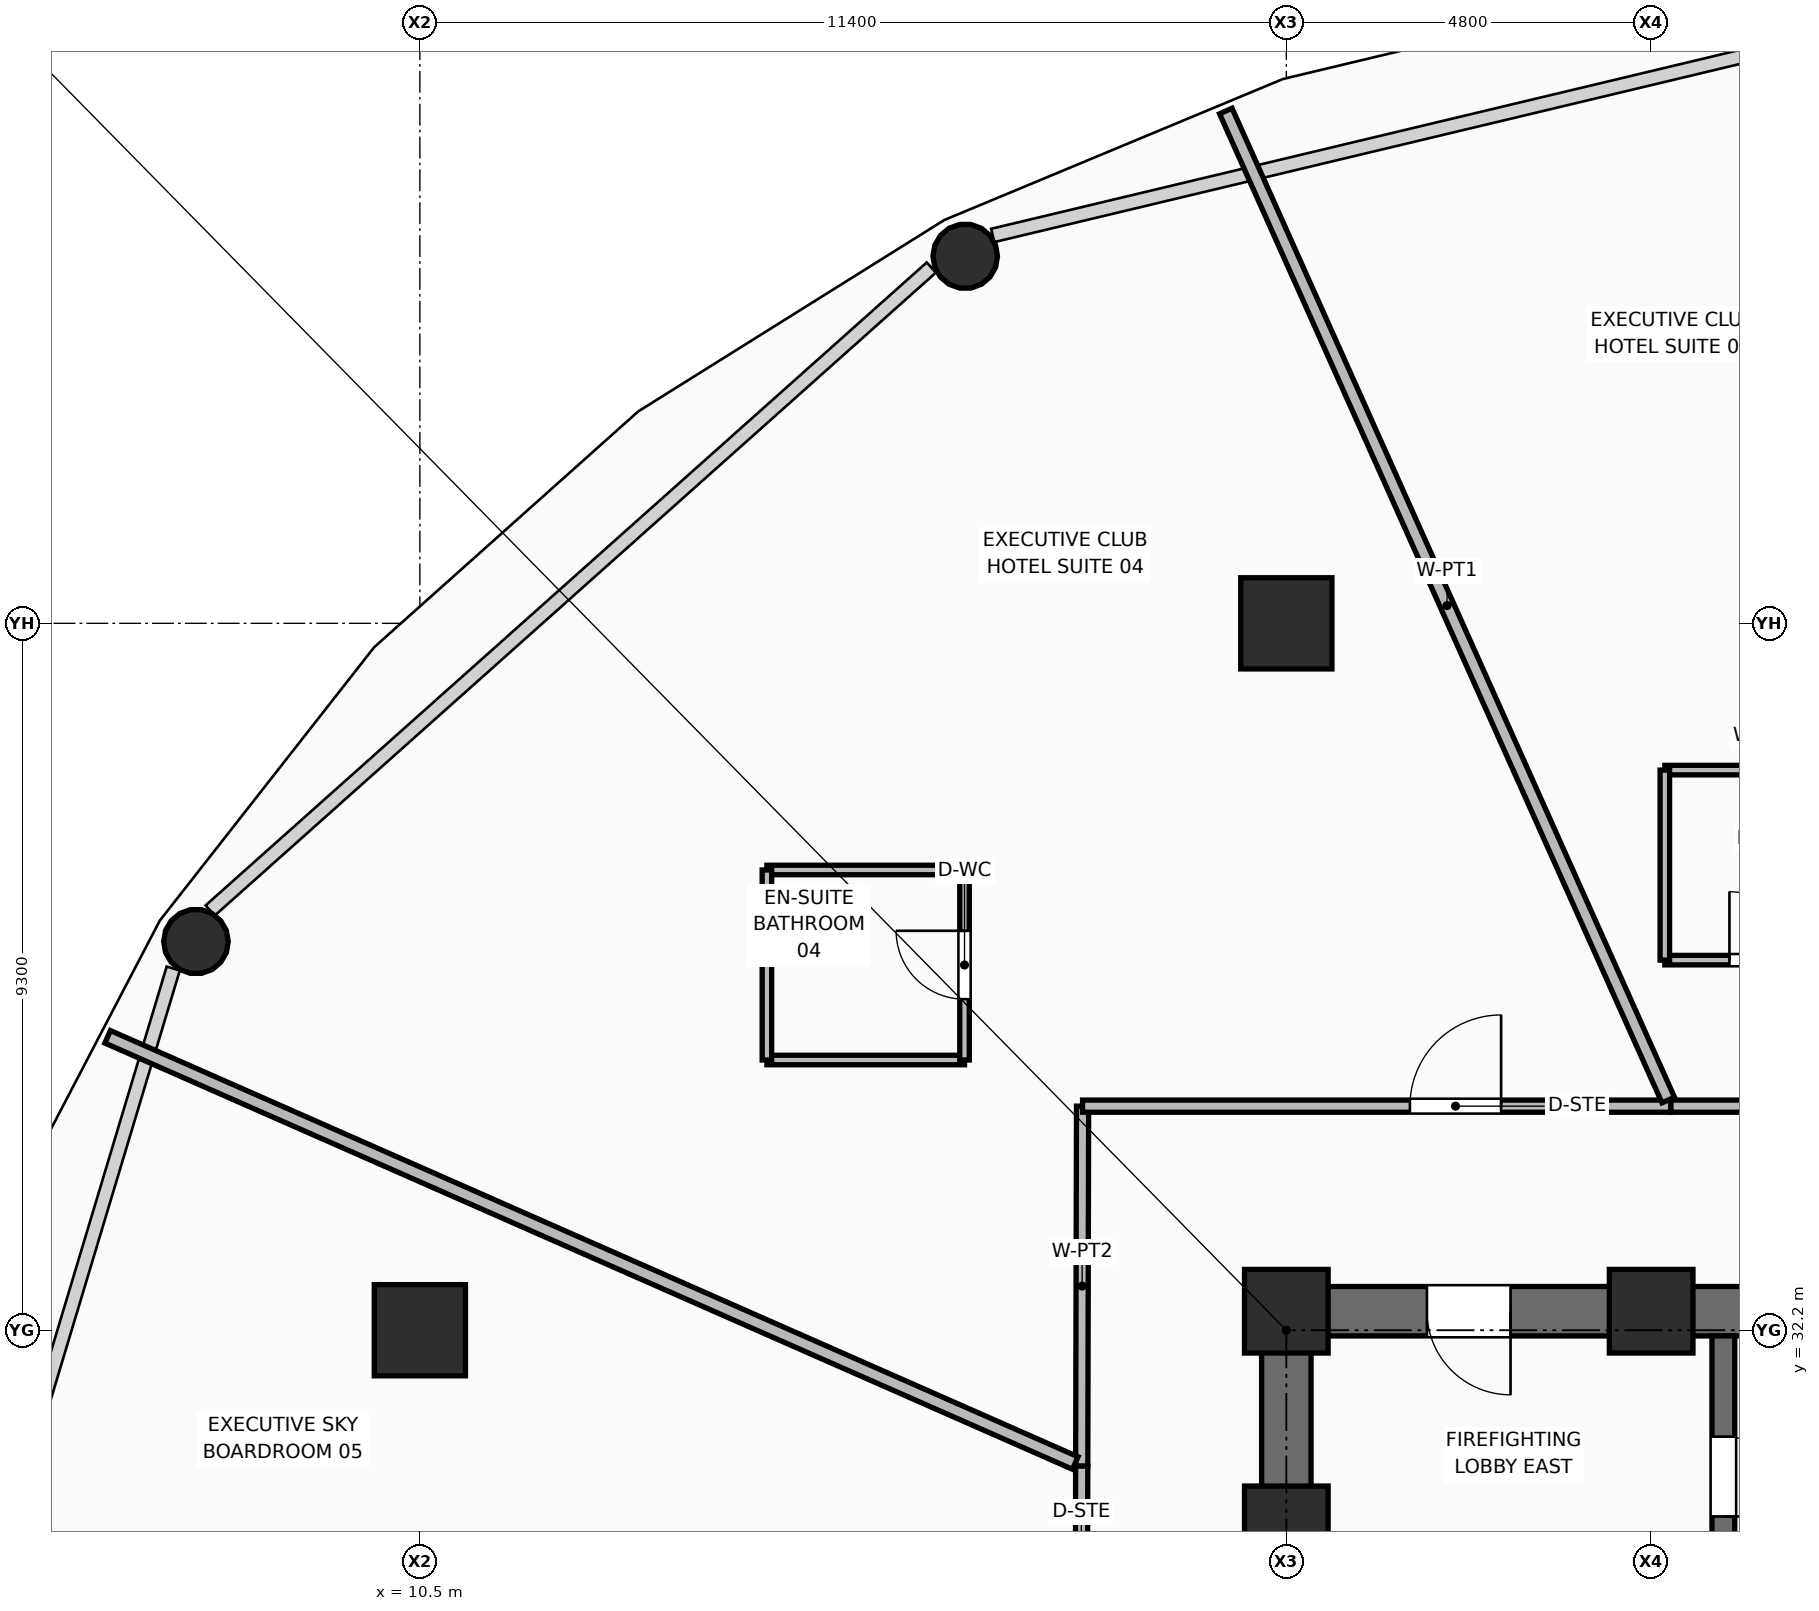
"""IFC4 building model, lengths in metres.
Left out: names, types, materials, properties, quantities, classifications, styles, units other than length and angle.
Written with IfcOpenShell. Run it as: python <this file> out.ifc"""

import sys

from ifc_helpers import new_model, si_unit, direction, frame, frame_2d, origin, origin_2d, place, context, subcontext, project, spatial, rectangle, hollow_rectangle, hollow_circle, extrude, element, fill, save


model = new_model("IFC4")
c1 = context("Model", 3, precision=1e-05, world=origin(), true_north=direction((0.0, 1.0)))
c2 = subcontext(c1, "Body", "Model", "MODEL_VIEW")
j1 = project(units=[si_unit("LENGTHUNIT", "METRE"), si_unit("PLANEANGLEUNIT", "RADIAN")], contexts=[c1])
p1 = place(None, origin())
s1 = spatial("IfcSite", under=j1, at=p1, CompositionType="ELEMENT")
p2 = place(p1, origin())
s2 = spatial("IfcBuilding", under=s1, at=p2, CompositionType="ELEMENT")
p3 = place(p2, frame((0.0, 0.0, 72.0)))
s3 = spatial("IfcBuildingStorey", under=s2, at=p3, CompositionType="ELEMENT", Elevation=72.0)
for number, where, z_axis, x_axis in (
    (1, (21.9, 29.6, 0.0), (0.0, 0.0, 1.0), (1.0, 0.0, 0.0)),
    (2, (21.9, 32.45, 0.0), (0.0, 0.0, 1.0), (1.0, 0.0, 0.0)),
    (3, (26.7, 32.45, 0.0), (0.0, 0.0, 1.0), (1.0, 0.0, 0.0)),
):
    element("IfcColumn", number, at=place(p3, frame(where, z_axis=z_axis, x_axis=x_axis)), inside=s3, PredefinedType="COLUMN", context=c2, shape_type="SweptSolid", body=[
        extrude(rectangle(XDim=1.1, YDim=1.1, at=origin_2d()), origin(), (0.0, 0.0, 1.0), 3.75),
    ])
for number, where, z_axis, x_axis in (
    (4, (10.5, 32.2, 0.0), (0.0, 0.0, 1.0), (1.0, 0.0, 0.0)),
    (5, (21.9, 41.5, 0.0), (0.0, 0.0, 1.0), (1.0, 0.0, 0.0)),
):
    element("IfcColumn", number, at=place(p3, frame(where, z_axis=z_axis, x_axis=x_axis)), inside=s3, PredefinedType="COLUMN", context=c2, shape_type="SweptSolid", body=[
        extrude(hollow_rectangle(XDim=1.2, YDim=1.2, WallThickness=0.045, at=origin_2d()), origin(), (0.0, 0.0, 1.0), 3.75),
    ])
for number, where, z_axis, x_axis in (
    (6, (17.675, 46.329, 0.0), (0.0, 0.0, 1.0), (1.0, 0.0, 0.0)),
    (7, (7.554, 37.314, 0.0), (0.0, 0.0, 1.0), (1.0, 0.0, 0.0)),
):
    element("IfcColumn", number, at=place(p3, frame(where, z_axis=z_axis, x_axis=x_axis)), inside=s3, PredefinedType="COLUMN", context=c2, shape_type="SweptSolid", body=[
        extrude(hollow_circle(Radius=0.425, WallThickness=0.04, at=origin_2d()), origin(), (0.0, 0.0, 1.0), 3.57),
    ])
p4 = place(p3, frame((21.575, 32.45, 0.0), z_axis=(0.0, 0.0, 1.0), x_axis=(1.0, 0.0, 0.0)))
e8 = element("IfcWall", 8, at=p4, inside=s3, PredefinedType="SHEAR", context=c2, shape_type="SweptSolid", body=[
    extrude(rectangle(XDim=19.85, YDim=0.65, at=frame_2d((9.925, 0.0))), origin(), (0.0, 0.0, 1.0), 3.57),
])
p5 = place(p4, frame((2.175, 0.0, 0.0)))
e9 = element("IfcOpeningElement", 9, at=p5, cuts=e8, PredefinedType="OPENING", context=c2, shape_type="SweptSolid", body=[
    extrude(rectangle(XDim=1.1, YDim=2.1, at=frame_2d((0.55, 1.05))), frame((0.0, 0.335, 0.0), z_axis=(0.0, -1.0, 0.0), x_axis=(1.0, 0.0, 0.0)), (0.0, 0.0, 1.0), 0.67),
])
p6 = place(p4, frame((15.565, 0.0, 0.0)))
e10 = element("IfcOpeningElement", 10, at=p6, cuts=e8, PredefinedType="OPENING", context=c2, shape_type="SweptSolid", body=[
    extrude(rectangle(XDim=1.0, YDim=2.1, at=frame_2d((0.5, 1.05))), frame((0.0, 0.335, 0.0), z_axis=(0.0, -1.0, 0.0), x_axis=(1.0, 0.0, 0.0)), (0.0, 0.0, 1.0), 0.67),
])
p7 = place(p4, frame((17.575, 0.0, 0.0)))
e11 = element("IfcOpeningElement", 11, at=p7, cuts=e8, PredefinedType="OPENING", context=c2, shape_type="SweptSolid", body=[
    extrude(rectangle(XDim=0.9, YDim=2.1, at=frame_2d((0.45, 1.05))), frame((0.0, 0.335, 0.0), z_axis=(0.0, -1.0, 0.0), x_axis=(1.0, 0.0, 0.0)), (0.0, 0.0, 1.0), 0.67),
])
p8 = place(p3, frame((21.9, 18.125, 0.0), z_axis=(0.0, 0.0, 1.0), x_axis=(0.0, 1.0, 0.0)))
e12 = element("IfcWall", 12, at=p8, inside=s3, PredefinedType="SHEAR", context=c2, shape_type="SweptSolid", body=[
    extrude(rectangle(XDim=14.0, YDim=0.65, at=frame_2d((7.0, 0.0))), origin(), (0.0, 0.0, 1.0), 3.57),
])
p9 = place(p3, frame((27.65, 28.75, 0.0), z_axis=(0.0, 0.0, 1.0), x_axis=(0.0, 1.0, 0.0)))
e13 = element("IfcWall", 13, at=p9, inside=s3, PredefinedType="SHEAR", context=c2, shape_type="SweptSolid", body=[
    extrude(rectangle(XDim=3.375, YDim=0.3, at=frame_2d((1.688, 0.0))), origin(), (0.0, 0.0, 1.0), 3.57),
])
p10 = place(p9, frame((1.0, 0.0, 0.0)))
e14 = element("IfcOpeningElement", 14, at=p10, cuts=e13, PredefinedType="OPENING", context=c2, shape_type="SweptSolid", body=[
    extrude(rectangle(XDim=1.05, YDim=2.1, at=frame_2d((0.525, 1.05))), frame((0.0, 0.16, 0.0), z_axis=(0.0, -1.0, 0.0), x_axis=(1.0, 0.0, 0.0)), (0.0, 0.0, 1.0), 0.32),
])
p11 = place(p3, frame((19.198, 26.142, 0.0), z_axis=(0.0, 0.0, 1.0), x_axis=(0.002342582991, 0.999997256149, 0.0)))
e15 = element("IfcWall", 15, at=p11, inside=s3, PredefinedType="PARTITIONING", context=c2, shape_type="SweptSolid", body=[
    extrude(rectangle(XDim=4.273, YDim=0.16, at=frame_2d((2.136, 0.0))), origin(), (0.0, 0.0, 1.0), 3.55),
])
p12 = place(p11, frame((1.464, 0.0, 0.0)))
e16 = element("IfcOpeningElement", 16, at=p12, cuts=e15, PredefinedType="OPENING", context=c2, shape_type="SweptSolid", body=[
    extrude(rectangle(XDim=1.2, YDim=2.1, at=frame_2d((0.6, 1.05))), frame((0.0, 0.09, 0.0), z_axis=(0.0, -1.0, 0.0), x_axis=(1.0, 0.0, 0.0)), (0.0, 0.0, 1.0), 0.18),
])
p13 = place(p3, frame((19.208, 30.415, 0.0), z_axis=(0.0, 0.0, 1.0), x_axis=(0.002321256513, 0.99999730588, 0.0)))
e17 = element("IfcWall", 17, at=p13, inside=s3, PredefinedType="PARTITIONING", context=c2, shape_type="SweptSolid", body=[
    extrude(rectangle(XDim=4.733, YDim=0.16, at=frame_2d((2.366, 0.0))), origin(), (0.0, 0.0, 1.0), 2.928),
])
p14 = place(p3, frame((19.219, 35.148, 0.0), z_axis=(0.0, 0.0, 1.0), x_axis=(1.0, 0.0, 0.0)))
e18 = element("IfcWall", 18, at=p14, inside=s3, PredefinedType="PARTITIONING", context=c2, shape_type="SweptSolid", body=[
    extrude(rectangle(XDim=7.741, YDim=0.16, at=frame_2d((3.871, 0.0))), origin(), (0.0, 0.0, 1.0), 2.928),
])
p15 = place(p14, frame((4.307, 0.0, 0.0)))
e19 = element("IfcOpeningElement", 19, at=p15, cuts=e18, PredefinedType="OPENING", context=c2, shape_type="SweptSolid", body=[
    extrude(rectangle(XDim=1.2, YDim=2.1, at=frame_2d((0.6, 1.05))), frame((0.0, 0.09, 0.0), z_axis=(0.0, -1.0, 0.0), x_axis=(1.0, 0.0, 0.0)), (0.0, 0.0, 1.0), 0.18),
])
p16 = place(p3, frame((26.96, 35.148, 0.0), z_axis=(0.0, 0.0, 1.0), x_axis=(1.0, 0.0, 0.0)))
e20 = element("IfcWall", 20, at=p16, inside=s3, PredefinedType="PARTITIONING", context=c2, shape_type="SweptSolid", body=[
    extrude(rectangle(XDim=4.344, YDim=0.16, at=frame_2d((2.172, 0.0))), origin(), (0.0, 0.0, 1.0), 2.928),
])
p17 = place(p16, frame((1.646, 0.0, 0.0)))
e21 = element("IfcOpeningElement", 21, at=p17, cuts=e20, PredefinedType="OPENING", context=c2, shape_type="SweptSolid", body=[
    extrude(rectangle(XDim=1.2, YDim=2.1, at=frame_2d((0.6, 1.05))), frame((0.0, 0.09, 0.0), z_axis=(0.0, -1.0, 0.0), x_axis=(1.0, 0.0, 0.0)), (0.0, 0.0, 1.0), 0.18),
])
p18 = place(p3, frame((26.925, 35.228, 0.0), z_axis=(0.0, 0.0, 1.0), x_axis=(-0.4083604268, 0.912820772016, 0.0)))
e22 = element("IfcWall", 22, at=p18, inside=s3, PredefinedType="PARTITIONING", context=c2, shape_type="SweptSolid", body=[
    extrude(rectangle(XDim=14.255, YDim=0.18, at=frame_2d((7.127, 0.0))), origin(), (0.0, 0.0, 1.0), 2.775),
])
p19 = place(p3, frame((19.123, 30.453, 0.0), z_axis=(0.0, 0.0, 1.0), x_axis=(-0.915167724462, 0.403073239131, 0.0)))
e23 = element("IfcWall", 23, at=p19, inside=s3, PredefinedType="PARTITIONING", context=c2, shape_type="SweptSolid", body=[
    extrude(rectangle(XDim=13.911, YDim=0.18, at=frame_2d((6.956, 0.0))), origin(), (0.0, 0.0, 1.0), 2.775),
])
p20 = place(p3, frame((26.88, 37.069, 0.0), z_axis=(0.0, 0.0, 1.0), x_axis=(1.0, 0.0, 0.0)))
e24 = element("IfcWall", 24, at=p20, inside=s3, PredefinedType="PARTITIONING", context=c2, shape_type="SweptSolid", body=[
    extrude(rectangle(XDim=2.6, YDim=0.125, at=frame_2d((1.3, 0.0))), origin(), (0.0, 0.0, 1.0), 3.55),
])
p21 = place(p20, frame((0.85, 0.0, 0.0)))
e25 = element("IfcOpeningElement", 25, at=p21, cuts=e24, PredefinedType="OPENING", context=c2, shape_type="SweptSolid", body=[
    extrude(rectangle(XDim=0.9, YDim=2.1, at=frame_2d((0.45, 1.05))), frame((0.0, 0.073, 0.0), z_axis=(0.0, -1.0, 0.0), x_axis=(1.0, 0.0, 0.0)), (0.0, 0.0, 1.0), 0.145),
])
p22 = place(p3, frame((26.88, 39.569, 0.0), z_axis=(0.0, 0.0, 1.0), x_axis=(1.0, 0.0, 0.0)))
e26 = element("IfcWall", 26, at=p22, inside=s3, PredefinedType="PARTITIONING", context=c2, shape_type="SweptSolid", body=[
    extrude(rectangle(XDim=2.6, YDim=0.125, at=frame_2d((1.3, 0.0))), origin(), (0.0, 0.0, 1.0), 3.55),
])
p23 = place(p3, frame((26.88, 37.069, 0.0), z_axis=(0.0, 0.0, 1.0), x_axis=(0.0, 1.0, 0.0)))
e27 = element("IfcWall", 27, at=p23, inside=s3, PredefinedType="PARTITIONING", context=c2, shape_type="SweptSolid", body=[
    extrude(rectangle(XDim=2.5, YDim=0.125, at=frame_2d((1.25, 0.0))), origin(), (0.0, 0.0, 1.0), 3.55),
])
for number, where, z_axis, x_axis in (
    (28, (15.066, 35.755, 0.0), (0.0, 0.0, 1.0), (1.0, 0.0, 0.0)),
    (29, (15.066, 38.255, 0.0), (0.0, 0.0, 1.0), (1.0, 0.0, 0.0)),
):
    element("IfcWall", number, at=place(p3, frame(where, z_axis=z_axis, x_axis=x_axis)), inside=s3, PredefinedType="PARTITIONING", context=c2, shape_type="SweptSolid", body=[
        extrude(rectangle(XDim=2.6, YDim=0.125, at=frame_2d((1.3, 0.0))), origin(), (0.0, 0.0, 1.0), 3.55),
    ])
p24 = place(p3, frame((15.066, 35.755, 0.0), z_axis=(0.0, 0.0, 1.0), x_axis=(0.0, 1.0, 0.0)))
e30 = element("IfcWall", 30, at=p24, inside=s3, PredefinedType="PARTITIONING", context=c2, shape_type="SweptSolid", body=[
    extrude(rectangle(XDim=2.5, YDim=0.125, at=frame_2d((1.25, 0.0))), origin(), (0.0, 0.0, 1.0), 3.55),
])
p25 = place(p3, frame((17.666, 35.755, 0.0), z_axis=(0.0, 0.0, 1.0), x_axis=(0.0, 1.0, 0.0)))
e31 = element("IfcWall", 31, at=p25, inside=s3, PredefinedType="PARTITIONING", context=c2, shape_type="SweptSolid", body=[
    extrude(rectangle(XDim=2.5, YDim=0.125, at=frame_2d((1.25, 0.0))), origin(), (0.0, 0.0, 1.0), 3.55),
])
p26 = place(p25, frame((0.8, 0.0, 0.0)))
e32 = element("IfcOpeningElement", 32, at=p26, cuts=e31, PredefinedType="OPENING", context=c2, shape_type="SweptSolid", body=[
    extrude(rectangle(XDim=0.9, YDim=2.1, at=frame_2d((0.45, 1.05))), frame((0.0, 0.073, 0.0), z_axis=(0.0, -1.0, 0.0), x_axis=(1.0, 0.0, 0.0)), (0.0, 0.0, 1.0), 0.145),
])
p27 = place(p10, frame((1.05, 0.0, 0.0), z_axis=(0.0, 0.0, 1.0), x_axis=(-1.0, 0.0, 0.0)))
e33 = element("IfcDoor", 33, at=p27, inside=s3, OperationType="SINGLE_SWING_RIGHT", PredefinedType="DOOR", context=c2, shape_type="SweptSolid", body=[
    extrude(rectangle(XDim=1.05, YDim=2.1, at=frame_2d((0.525, 1.05))), frame((0.0, 0.025, 0.0), z_axis=(0.0, -1.0, 0.0), x_axis=(1.0, 0.0, 0.0)), (0.0, 0.0, 1.0), 0.05),
])
fill(e14, e33)
p28 = place(p5, frame((1.1, 0.0, 0.0), z_axis=(0.0, 0.0, 1.0), x_axis=(-1.0, 0.0, 0.0)))
e34 = element("IfcDoor", 34, at=p28, inside=s3, OperationType="SINGLE_SWING_LEFT", PredefinedType="DOOR", context=c2, shape_type="SweptSolid", body=[
    extrude(rectangle(XDim=1.1, YDim=2.1, at=frame_2d((0.55, 1.05))), frame((0.0, 0.025, 0.0), z_axis=(0.0, -1.0, 0.0), x_axis=(1.0, 0.0, 0.0)), (0.0, 0.0, 1.0), 0.05),
])
fill(e9, e34)
p29 = place(p21, origin())
e35 = element("IfcDoor", 35, at=p29, inside=s3, OperationType="SINGLE_SWING_LEFT", PredefinedType="DOOR", context=c2, shape_type="SweptSolid", body=[
    extrude(rectangle(XDim=0.9, YDim=2.1, at=frame_2d((0.45, 1.05))), frame((0.0, 0.025, 0.0), z_axis=(0.0, -1.0, 0.0), x_axis=(1.0, 0.0, 0.0)), (0.0, 0.0, 1.0), 0.05),
])
fill(e25, e35)
p30 = place(p26, origin())
e36 = element("IfcDoor", 36, at=p30, inside=s3, OperationType="SINGLE_SWING_RIGHT", PredefinedType="DOOR", context=c2, shape_type="SweptSolid", body=[
    extrude(rectangle(XDim=0.9, YDim=2.1, at=frame_2d((0.45, 1.05))), frame((0.0, 0.025, 0.0), z_axis=(0.0, -1.0, 0.0), x_axis=(1.0, 0.0, 0.0)), (0.0, 0.0, 1.0), 0.05),
])
fill(e32, e36)
p31 = place(p15, origin())
e37 = element("IfcDoor", 37, at=p31, inside=s3, OperationType="SINGLE_SWING_RIGHT", PredefinedType="DOOR", context=c2, shape_type="SweptSolid", body=[
    extrude(rectangle(XDim=1.2, YDim=2.1, at=frame_2d((0.6, 1.05))), frame((0.0, 0.025, 0.0), z_axis=(0.0, -1.0, 0.0), x_axis=(1.0, 0.0, 0.0)), (0.0, 0.0, 1.0), 0.05),
])
fill(e19, e37)
save(model, sys.argv[1])
